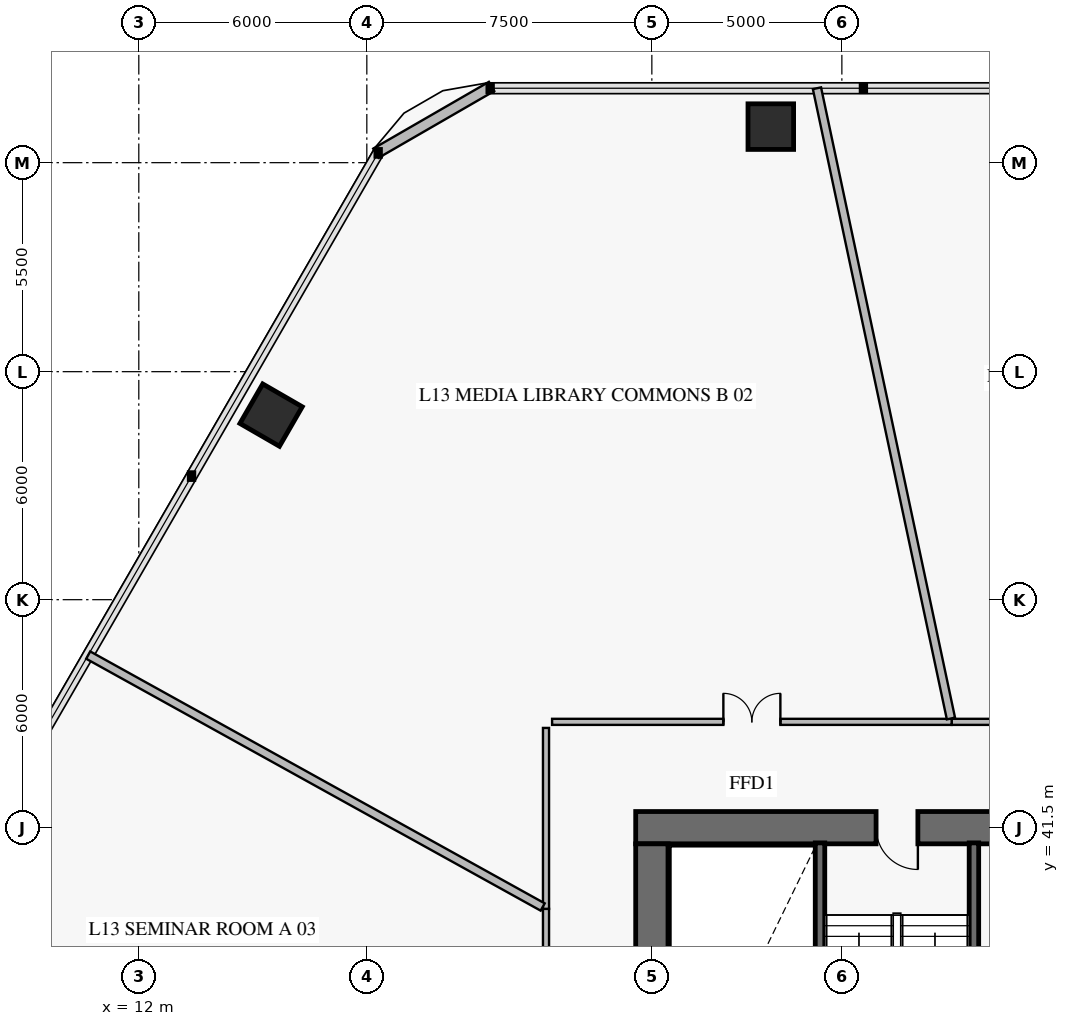
"""IFC4 building model, lengths in metres.
Left out: names, types, materials, properties, quantities, classifications, styles, units other than length and angle.
Written with IfcOpenShell. Run it as: python <this file> out.ifc"""

import sys

from ifc_helpers import new_model, si_unit, direction, frame, frame_2d, origin, origin_2d, place, context, subcontext, project, spatial, rectangle, extrude, element, fill, save


model = new_model("IFC4")
c1 = context("Model", 3, precision=1e-05, world=origin(), true_north=direction((0.0, 1.0)))
c2 = subcontext(c1, "Body", "Model", "MODEL_VIEW")
j1 = project(units=[si_unit("LENGTHUNIT", "METRE"), si_unit("PLANEANGLEUNIT", "RADIAN")], contexts=[c1])
p1 = place(None, origin())
s1 = spatial("IfcSite", under=j1, at=p1, CompositionType="ELEMENT")
p2 = place(p1, origin())
s2 = spatial("IfcBuilding", under=s1, at=p2, CompositionType="ELEMENT")
p3 = place(p2, frame((0.0, 0.0, 54.0)))
s3 = spatial("IfcBuildingStorey", under=s2, at=p3, CompositionType="ELEMENT", Elevation=54.0)
p4 = place(p3, frame((36.75, 41.5, 0.0), z_axis=(0.0, 0.0, 1.0), x_axis=(-1.0, 0.0, 0.0)))
e1 = element("IfcWall", 1, at=p4, inside=s3, PredefinedType="SHEAR", context=c2, shape_type="SweptSolid", body=[
    extrude(rectangle(XDim=11.675, YDim=0.85, at=frame_2d((5.837, 0.0))), origin(), (0.0, 0.0, 1.0), 4.2),
])
p5 = place(p4, frame((4.25, 0.0, 0.0)))
e2 = element("IfcOpeningElement", 2, at=p5, cuts=e1, PredefinedType="OPENING", context=c2, shape_type="SweptSolid", body=[
    extrude(rectangle(XDim=1.1, YDim=2.15, at=frame_2d((0.55, 1.075))), frame((0.0, 0.437, 0.0), z_axis=(0.0, -1.0, 0.0), x_axis=(1.0, 0.0, 0.0)), (0.0, 0.0, 1.0), 0.874),
])
p6 = place(p3, frame((25.5, 22.925, 0.0), z_axis=(0.0, 0.0, 1.0), x_axis=(0.0, 1.0, 0.0)))
e3 = element("IfcWall", 3, at=p6, inside=s3, PredefinedType="SHEAR", context=c2, shape_type="SweptSolid", body=[
    extrude(rectangle(XDim=18.15, YDim=0.85, at=frame_2d((9.075, 0.0))), origin(), (0.0, 0.0, 1.0), 4.2),
])
p7 = place(p6, frame((8.825, 0.0, 0.0)))
e4 = element("IfcOpeningElement", 4, at=p7, cuts=e3, PredefinedType="OPENING", context=c2, shape_type="SweptSolid", body=[
    extrude(rectangle(XDim=1.1, YDim=2.15, at=frame_2d((0.55, 1.075))), frame((0.0, 0.437, 0.0), z_axis=(0.0, -1.0, 0.0), x_axis=(1.0, 0.0, 0.0)), (0.0, 0.0, 1.0), 0.874),
])
for number, where, z_axis, x_axis in (
    (5, (28.63, 59.948, 0.0), (0.0, 0.0, 1.0), (-1.0, 0.0, 0.0)),
    (6, (15.481, 52.357, 0.0), (0.0, 0.0, 1.0), (-0.5, -0.866, 0.0)),
):
    element("IfcColumn", number, at=place(p3, frame(where, z_axis=z_axis, x_axis=x_axis)), inside=s3, PredefinedType="COLUMN", context=c2, shape_type="SweptSolid", body=[
        extrude(rectangle(XDim=1.2, YDim=1.2, at=origin_2d()), origin(), (0.0, 0.0, 1.0), 3.92),
    ])
p8 = place(p3, frame((18.239, 59.249, 0.0), z_axis=(0.0, 0.0, 1.0), x_axis=(0.866007452331, 0.500031091541, 0.0)))
e7 = element("IfcWall", 7, at=p8, inside=s3, PredefinedType="SOLIDWALL", context=c2, shape_type="SweptSolid", body=[
    extrude(rectangle(XDim=3.515, YDim=0.28, at=frame_2d((1.757, 0.0))), origin(), (0.0, 0.0, 1.0), 3.92),
])
for number, where, z_axis, x_axis in (
    (8, (29.925, 31.4, 0.0), (0.0, 0.0, 1.0), (0.0, 1.0, 0.0)),
    (9, (33.975, 31.4, 0.0), (0.0, 0.0, 1.0), (0.0, 1.0, 0.0)),
):
    element("IfcWall", number, at=place(p3, frame(where, z_axis=z_axis, x_axis=x_axis)), inside=s3, PredefinedType="SOLIDWALL", context=c2, shape_type="SweptSolid", body=[
        extrude(rectangle(XDim=9.7, YDim=0.25, at=frame_2d((4.85, 0.0))), origin(), (0.0, 0.0, 1.0), 4.2),
    ])
p9 = place(p3, frame((45.257, 44.285, 0.0), z_axis=(0.0, 0.0, 1.0), x_axis=(-1.0, 0.0, 0.0)))
e10 = element("IfcWall", 10, at=p9, inside=s3, PredefinedType="PARTITIONING", context=c2, shape_type="SweptSolid", body=[
    extrude(rectangle(XDim=11.869, YDim=0.16, at=frame_2d((5.934, 0.0))), origin(), (0.0, 0.0, 1.0), 3.22),
])
p10 = place(p9, frame((5.184, 0.0, 0.0)))
e11 = element("IfcOpeningElement", 11, at=p10, cuts=e10, PredefinedType="OPENING", context=c2, shape_type="SweptSolid", body=[
    extrude(rectangle(XDim=1.5, YDim=2.15, at=frame_2d((0.75, 1.075))), frame((0.0, 0.092, 0.0), z_axis=(0.0, -1.0, 0.0), x_axis=(1.0, 0.0, 0.0)), (0.0, 0.0, 1.0), 0.184),
])
p11 = place(p3, frame((33.389, 44.285, 0.0), z_axis=(0.0, 0.0, 1.0), x_axis=(-1.0, 0.0, 0.0)))
e12 = element("IfcWall", 12, at=p11, inside=s3, PredefinedType="PARTITIONING", context=c2, shape_type="SweptSolid", body=[
    extrude(rectangle(XDim=10.514, YDim=0.16, at=frame_2d((5.257, 0.0))), origin(), (0.0, 0.0, 1.0), 3.22),
])
p12 = place(p11, frame((4.507, 0.0, 0.0)))
e13 = element("IfcOpeningElement", 13, at=p12, cuts=e12, PredefinedType="OPENING", context=c2, shape_type="SweptSolid", body=[
    extrude(rectangle(XDim=1.5, YDim=2.15, at=frame_2d((0.75, 1.075))), frame((0.0, 0.092, 0.0), z_axis=(0.0, -1.0, 0.0), x_axis=(1.0, 0.0, 0.0)), (0.0, 0.0, 1.0), 0.184),
])
p13 = place(p3, frame((22.715, 39.364, 0.0), z_axis=(0.0, 0.0, 1.0), x_axis=(0.0, -1.0, 0.0)))
e14 = element("IfcWall", 14, at=p13, inside=s3, PredefinedType="PARTITIONING", context=c2, shape_type="SweptSolid", body=[
    extrude(rectangle(XDim=6.202, YDim=0.16, at=frame_2d((3.101, 0.0))), origin(), (0.0, 0.0, 1.0), 3.22),
])
p14 = place(p13, frame((2.526, 0.0, 0.0)))
e15 = element("IfcOpeningElement", 15, at=p14, cuts=e14, PredefinedType="OPENING", context=c2, shape_type="SweptSolid", body=[
    extrude(rectangle(XDim=1.15, YDim=2.2, at=frame_2d((0.575, 1.1))), frame((0.0, 0.092, 0.0), z_axis=(0.0, -1.0, 0.0), x_axis=(1.0, 0.0, 0.0)), (0.0, 0.0, 1.0), 0.184),
])
p15 = place(p3, frame((33.37, 44.373, 0.0), z_axis=(0.0, 0.0, 1.0), x_axis=(-0.207914205497, 0.978147066219, 0.0)))
e16 = element("IfcWall", 16, at=p15, inside=s3, PredefinedType="PARTITIONING", context=c2, shape_type="SweptSolid", body=[
    extrude(rectangle(XDim=16.956, YDim=0.22, at=frame_2d((8.478, 0.0))), origin(), (0.0, 0.0, 1.0), 3.17),
])
p16 = place(p3, frame((22.715, 44.125, 0.0), z_axis=(0.0, 0.0, 1.0), x_axis=(0.0, -1.0, 0.0)))
e17 = element("IfcWall", 17, at=p16, inside=s3, PredefinedType="PARTITIONING", context=c2, shape_type="SweptSolid", body=[
    extrude(rectangle(XDim=4.761, YDim=0.16, at=frame_2d((2.38, 0.0))), origin(), (0.0, 0.0, 1.0), 3.92),
])
p17 = place(p3, frame((22.627, 39.413, 0.0), z_axis=(0.0, 0.0, 1.0), x_axis=(-0.874620963666, 0.484807353405, 0.0)))
e18 = element("IfcWall", 18, at=p17, inside=s3, PredefinedType="PARTITIONING", context=c2, shape_type="SweptSolid", body=[
    extrude(rectangle(XDim=13.673, YDim=0.22, at=frame_2d((6.836, 0.0))), origin(), (0.0, 0.0, 1.0), 3.17),
])
p18 = place(p5, origin())
e19 = element("IfcDoor", 19, at=p18, inside=s3, OperationType="SINGLE_SWING_LEFT", PredefinedType="USERDEFINED", context=c2, shape_type="SweptSolid", body=[
    extrude(rectangle(XDim=1.1, YDim=2.15, at=frame_2d((0.55, 1.075))), frame((0.0, 0.025, 0.0), z_axis=(0.0, -1.0, 0.0), x_axis=(1.0, 0.0, 0.0)), (0.0, 0.0, 1.0), 0.05),
])
fill(e2, e19)
p19 = place(p12, frame((1.5, 0.0, 0.0), z_axis=(0.0, 0.0, 1.0), x_axis=(-1.0, 0.0, 0.0)))
e20 = element("IfcDoor", 20, at=p19, inside=s3, OperationType="DOUBLE_DOOR_SINGLE_SWING", PredefinedType="DOOR", context=c2, shape_type="SweptSolid", body=[
    extrude(rectangle(XDim=1.5, YDim=2.15, at=frame_2d((0.75, 1.075))), frame((0.0, 0.025, 0.0), z_axis=(0.0, -1.0, 0.0), x_axis=(1.0, 0.0, 0.0)), (0.0, 0.0, 1.0), 0.05),
])
fill(e13, e20)
save(model, sys.argv[1])
